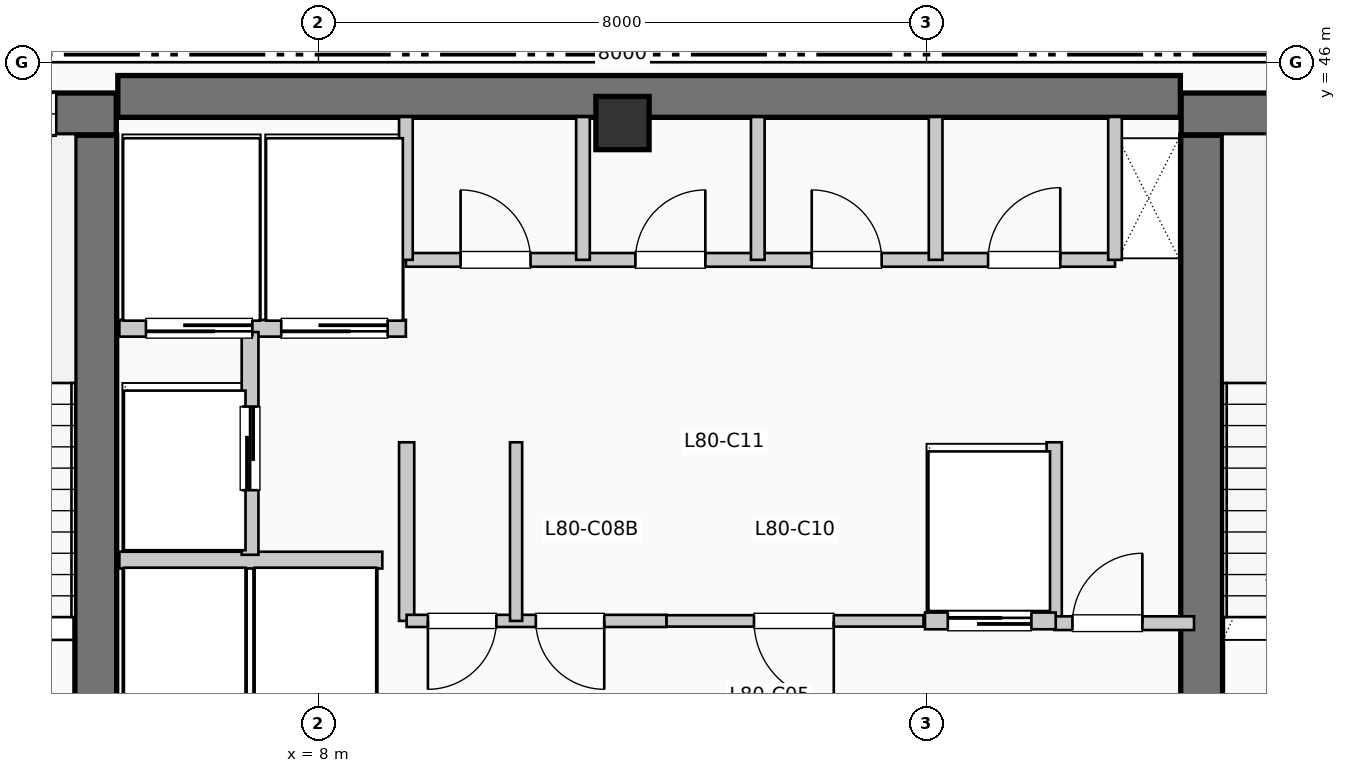
"""IFC4 building model, lengths in metres.
Left out: names, types, materials, properties, quantities, classifications, styles, units other than length and angle.
Written with IfcOpenShell. Run it as: python <this file> out.ifc"""

import sys

from ifc_helpers import new_model, si_unit, direction, frame, frame_2d, origin, origin_2d, place, context, subcontext, project, spatial, rectangle, extrude, element, fill, save


model = new_model("IFC4")
c1 = context("Model", 3, precision=1e-05, world=origin(), true_north=direction((0.0, 1.0)))
c2 = subcontext(c1, "Body", "Model", "MODEL_VIEW")
j1 = project(units=[si_unit("LENGTHUNIT", "METRE"), si_unit("PLANEANGLEUNIT", "RADIAN")], contexts=[c1])
p1 = place(None, origin())
s1 = spatial("IfcSite", under=j1, at=p1, CompositionType="ELEMENT")
p2 = place(p1, origin())
s2 = spatial("IfcBuilding", under=s1, at=p2, CompositionType="ELEMENT")
p3 = place(p2, frame((0.0, 0.0, 327.69)))
s3 = spatial("IfcBuildingStorey", under=s2, at=p3, CompositionType="ELEMENT", Elevation=327.69)
p4 = place(p3, frame((5.36, 45.55, 0.0), z_axis=(0.0, 0.0, 1.0), x_axis=(1.0, 0.0, 0.0)))
e1 = element("IfcWall", 1, at=p4, inside=s3, PredefinedType="SHEAR", context=c2, shape_type="SweptSolid", body=[
    extrude(rectangle(XDim=13.98, YDim=0.55, at=frame_2d((6.99, 0.0))), origin(), (0.0, 0.0, 1.0), 3.96),
])
p5 = place(p3, frame((5.07, 37.15, 0.0), z_axis=(0.0, 0.0, 1.0), x_axis=(0.0, 1.0, 0.0)))
e2 = element("IfcWall", 2, at=p5, inside=s3, PredefinedType="SHEAR", context=c2, shape_type="SweptSolid", body=[
    extrude(rectangle(XDim=7.89, YDim=0.55, at=frame_2d((3.945, 0.0))), origin(), (0.0, 0.0, 1.0), 3.96),
])
p6 = place(p3, frame((1.1, 45.32, 0.0), z_axis=(0.0, 0.0, 1.0), x_axis=(1.0, 0.0, 0.0)))
e3 = element("IfcWall", 3, at=p6, inside=s3, PredefinedType="SHEAR", context=c2, shape_type="SweptSolid", body=[
    extrude(rectangle(XDim=4.24, YDim=0.55, at=frame_2d((2.12, 0.0))), origin(), (0.0, 0.0, 1.0), 3.96),
])
p7 = place(p6, frame((2.05, 0.0, 1.05)))
e4 = element("IfcOpeningElement", 4, at=p7, cuts=e3, PredefinedType="OPENING", context=c2, shape_type="SweptSolid", body=[
    extrude(rectangle(XDim=1.4, YDim=1.8, at=frame_2d((0.7, 0.9))), frame((0.0, 0.285, 0.0), z_axis=(0.0, -1.0, 0.0), x_axis=(1.0, 0.0, 0.0)), (0.0, 0.0, 1.0), 0.57),
])
p8 = place(p3, frame((19.62, 37.15, 0.0), z_axis=(0.0, 0.0, 1.0), x_axis=(0.0, 1.0, 0.0)))
e5 = element("IfcWall", 5, at=p8, inside=s3, PredefinedType="SHEAR", context=c2, shape_type="SweptSolid", body=[
    extrude(rectangle(XDim=7.89, YDim=0.55, at=frame_2d((3.945, 0.0))), origin(), (0.0, 0.0, 1.0), 3.96),
])
p9 = place(p3, frame((19.35, 45.32, 0.0), z_axis=(0.0, 0.0, 1.0), x_axis=(1.0, 0.0, 0.0)))
e6 = element("IfcWall", 6, at=p9, inside=s3, PredefinedType="SHEAR", context=c2, shape_type="SweptSolid", body=[
    extrude(rectangle(XDim=3.69, YDim=0.55, at=frame_2d((1.845, 0.0))), origin(), (0.0, 0.0, 1.0), 3.96),
])
p10 = place(p9, frame((1.15, 0.0, 1.05)))
e7 = element("IfcOpeningElement", 7, at=p10, cuts=e6, PredefinedType="OPENING", context=c2, shape_type="SweptSolid", body=[
    extrude(rectangle(XDim=1.4, YDim=1.8, at=frame_2d((0.7, 0.9))), frame((0.0, 0.285, 0.0), z_axis=(0.0, -1.0, 0.0), x_axis=(1.0, 0.0, 0.0)), (0.0, 0.0, 1.0), 0.57),
])
p11 = place(p3, frame((12.0, 45.2, 0.0), z_axis=(0.0, 0.0, 1.0), x_axis=(1.0, 0.0, 0.0)))
e8 = element("IfcColumn", 8, at=p11, inside=s3, PredefinedType="COLUMN", context=c2, shape_type="SweptSolid", body=[
    extrude(rectangle(XDim=0.7, YDim=0.7, at=origin_2d()), origin(), (0.0, 0.0, 1.0), 3.96),
])
p12 = place(p3, frame((5.38, 39.45, 0.0), z_axis=(0.0, 0.0, 1.0), x_axis=(1.0, 0.0, 0.0)))
e9 = element("IfcWall", 9, at=p12, inside=s3, PredefinedType="PARTITIONING", context=c2, shape_type="SweptSolid", body=[
    extrude(rectangle(XDim=3.46, YDim=0.22, at=frame_2d((1.73, 0.0))), origin(), (0.0, 0.0, 1.0), 3.74),
])
p13 = place(p3, frame((5.38, 42.5, 0.0), z_axis=(0.0, 0.0, 1.0), x_axis=(1.0, 0.0, 0.0)))
e10 = element("IfcWall", 10, at=p13, inside=s3, PredefinedType="PARTITIONING", context=c2, shape_type="SweptSolid", body=[
    extrude(rectangle(XDim=3.77, YDim=0.22, at=frame_2d((1.885, 0.0))), origin(), (0.0, 0.0, 1.0), 3.74),
])
p14 = place(p13, frame((1.75, 0.0, 0.0), z_axis=(0.0, 0.0, 1.0), x_axis=(-1.0, 0.0, 0.0)))
e11 = element("IfcOpeningElement", 11, at=p14, cuts=e10, PredefinedType="OPENING", context=c2, shape_type="SweptSolid", body=[
    extrude(rectangle(XDim=1.4, YDim=2.2, at=frame_2d((0.7, 1.1))), frame((0.0, 0.12, 0.0), z_axis=(0.0, -1.0, 0.0), x_axis=(1.0, 0.0, 0.0)), (0.0, 0.0, 1.0), 0.24),
])
p15 = place(p13, frame((3.53, 0.0, 0.0), z_axis=(0.0, 0.0, 1.0), x_axis=(-1.0, 0.0, 0.0)))
e12 = element("IfcOpeningElement", 12, at=p15, cuts=e10, PredefinedType="OPENING", context=c2, shape_type="SweptSolid", body=[
    extrude(rectangle(XDim=1.4, YDim=2.2, at=frame_2d((0.7, 1.1))), frame((0.0, 0.12, 0.0), z_axis=(0.0, -1.0, 0.0), x_axis=(1.0, 0.0, 0.0)), (0.0, 0.0, 1.0), 0.24),
])
p16 = place(p3, frame((7.1, 39.52, 0.0), z_axis=(0.0, 0.0, 1.0), x_axis=(0.0, 1.0, 0.0)))
e13 = element("IfcWall", 13, at=p16, inside=s3, PredefinedType="PARTITIONING", context=c2, shape_type="SweptSolid", body=[
    extrude(rectangle(XDim=2.93, YDim=0.22, at=frame_2d((1.465, 0.0))), origin(), (0.0, 0.0, 1.0), 3.74),
])
p17 = place(p16, frame((0.85, 0.0, 0.0)))
e14 = element("IfcOpeningElement", 14, at=p17, cuts=e13, PredefinedType="OPENING", context=c2, shape_type="SweptSolid", body=[
    extrude(rectangle(XDim=1.1, YDim=2.2, at=frame_2d((0.55, 1.1))), frame((0.0, 0.12, 0.0), z_axis=(0.0, -1.0, 0.0), x_axis=(1.0, 0.0, 0.0)), (0.0, 0.0, 1.0), 0.24),
])
for number, where, z_axis, x_axis in (
    (15, (9.16, 38.65, 0.0), (0.0, 0.0, 1.0), (0.0, 1.0, 0.0)),
    (16, (17.68, 38.65, 0.0), (0.0, 0.0, 1.0), (0.0, 1.0, 0.0)),
):
    element("IfcWall", number, at=place(p3, frame(where, z_axis=z_axis, x_axis=x_axis)), inside=s3, PredefinedType="PARTITIONING", context=c2, shape_type="SweptSolid", body=[
        extrude(rectangle(XDim=2.35, YDim=0.2, at=frame_2d((1.175, 0.0))), origin(), (0.0, 0.0, 1.0), 3.74),
    ])
p18 = place(p3, frame((17.68, 38.62, 0.0), z_axis=(0.0, 0.0, 1.0), x_axis=(1.0, 0.0, 0.0)))
e17 = element("IfcWall", 17, at=p18, inside=s3, PredefinedType="PARTITIONING", context=c2, shape_type="SweptSolid", body=[
    extrude(rectangle(XDim=1.84, YDim=0.18, at=frame_2d((0.92, 0.0))), origin(), (0.0, 0.0, 1.0), 3.74),
])
p19 = place(p18, frame((0.24, 0.0, 0.0)))
e18 = element("IfcOpeningElement", 18, at=p19, cuts=e17, PredefinedType="OPENING", context=c2, shape_type="SweptSolid", body=[
    extrude(rectangle(XDim=0.92, YDim=2.1, at=frame_2d((0.46, 1.05))), frame((0.0, 0.1, 0.0), z_axis=(0.0, -1.0, 0.0), x_axis=(1.0, 0.0, 0.0)), (0.0, 0.0, 1.0), 0.2),
])
p20 = place(p3, frame((9.16, 38.65, 0.0), z_axis=(0.0, 0.0, 1.0), x_axis=(1.0, 0.0, 0.0)))
e19 = element("IfcWall", 19, at=p20, inside=s3, PredefinedType="PARTITIONING", context=c2, shape_type="SweptSolid", body=[
    extrude(rectangle(XDim=3.42, YDim=0.16, at=frame_2d((1.71, 0.0))), origin(), (0.0, 0.0, 1.0), 3.74),
])
p21 = place(p20, frame((1.18, 0.0, 0.0), z_axis=(0.0, 0.0, 1.0), x_axis=(-1.0, 0.0, 0.0)))
e20 = element("IfcOpeningElement", 20, at=p21, cuts=e19, PredefinedType="OPENING", context=c2, shape_type="SweptSolid", body=[
    extrude(rectangle(XDim=0.9, YDim=2.15, at=frame_2d((0.45, 1.075))), frame((0.0, 0.09, 0.0), z_axis=(0.0, -1.0, 0.0), x_axis=(1.0, 0.0, 0.0)), (0.0, 0.0, 1.0), 0.18),
])
p22 = place(p20, frame((2.6, 0.0, 0.0), z_axis=(0.0, 0.0, 1.0), x_axis=(-1.0, 0.0, 0.0)))
e21 = element("IfcOpeningElement", 21, at=p22, cuts=e19, PredefinedType="OPENING", context=c2, shape_type="SweptSolid", body=[
    extrude(rectangle(XDim=0.9, YDim=2.15, at=frame_2d((0.45, 1.075))), frame((0.0, 0.09, 0.0), z_axis=(0.0, -1.0, 0.0), x_axis=(1.0, 0.0, 0.0)), (0.0, 0.0, 1.0), 0.18),
])
p23 = place(p3, frame((10.6, 38.65, 0.0), z_axis=(0.0, 0.0, 1.0), x_axis=(0.0, 1.0, 0.0)))
e22 = element("IfcWall", 22, at=p23, inside=s3, PredefinedType="PARTITIONING", context=c2, shape_type="SweptSolid", body=[
    extrude(rectangle(XDim=2.35, YDim=0.16, at=frame_2d((1.175, 0.0))), origin(), (0.0, 0.0, 1.0), 3.74),
])
p24 = place(p3, frame((12.58, 38.65, 0.0), z_axis=(0.0, 0.0, 1.0), x_axis=(1.0, 0.0, 0.0)))
e23 = element("IfcWall", 23, at=p24, inside=s3, PredefinedType="PARTITIONING", context=c2, shape_type="SweptSolid", body=[
    extrude(rectangle(XDim=3.38, YDim=0.15, at=frame_2d((1.69, 0.0))), origin(), (0.0, 0.0, 1.0), 3.74),
])
p25 = place(p24, frame((2.2, 0.0, 0.0), z_axis=(0.0, 0.0, 1.0), x_axis=(-1.0, 0.0, 0.0)))
e24 = element("IfcOpeningElement", 24, at=p25, cuts=e23, PredefinedType="OPENING", context=c2, shape_type="SweptSolid", body=[
    extrude(rectangle(XDim=1.05, YDim=2.15, at=frame_2d((0.525, 1.075))), frame((0.0, 0.085, 0.0), z_axis=(0.0, -1.0, 0.0), x_axis=(1.0, 0.0, 0.0)), (0.0, 0.0, 1.0), 0.17),
])
p26 = place(p3, frame((15.98, 38.65, 0.0), z_axis=(0.0, 0.0, 1.0), x_axis=(1.0, 0.0, 0.0)))
e25 = element("IfcWall", 25, at=p26, inside=s3, PredefinedType="PARTITIONING", context=c2, shape_type="SweptSolid", body=[
    extrude(rectangle(XDim=1.72, YDim=0.22, at=frame_2d((0.86, 0.0))), origin(), (0.0, 0.0, 1.0), 3.74),
])
p27 = place(p26, frame((0.3, 0.0, 0.0)))
e26 = element("IfcOpeningElement", 26, at=p27, cuts=e25, PredefinedType="OPENING", context=c2, shape_type="SweptSolid", body=[
    extrude(rectangle(XDim=1.1, YDim=2.2, at=frame_2d((0.55, 1.1))), frame((0.0, 0.12, 0.0), z_axis=(0.0, -1.0, 0.0), x_axis=(1.0, 0.0, 0.0)), (0.0, 0.0, 1.0), 0.24),
])
p28 = place(p3, frame((9.15, 43.4, 0.0), z_axis=(0.0, 0.0, 1.0), x_axis=(1.0, 0.0, 0.0)))
e27 = element("IfcWall", 27, at=p28, inside=s3, PredefinedType="PLUMBINGWALL", context=c2, shape_type="SweptSolid", body=[
    extrude(rectangle(XDim=9.33, YDim=0.18, at=frame_2d((4.665, 0.0))), origin(), (0.0, 0.0, 1.0), 3.74),
])
p29 = place(p28, frame((0.72, 0.0, 0.0)))
e28 = element("IfcOpeningElement", 28, at=p29, cuts=e27, PredefinedType="OPENING", context=c2, shape_type="SweptSolid", body=[
    extrude(rectangle(XDim=0.92, YDim=2.1, at=frame_2d((0.46, 1.05))), frame((0.0, 0.1, 0.0), z_axis=(0.0, -1.0, 0.0), x_axis=(1.0, 0.0, 0.0)), (0.0, 0.0, 1.0), 0.2),
])
p30 = place(p28, frame((3.02, 0.0, 0.0)))
e29 = element("IfcOpeningElement", 29, at=p30, cuts=e27, PredefinedType="OPENING", context=c2, shape_type="SweptSolid", body=[
    extrude(rectangle(XDim=0.92, YDim=2.1, at=frame_2d((0.46, 1.05))), frame((0.0, 0.1, 0.0), z_axis=(0.0, -1.0, 0.0), x_axis=(1.0, 0.0, 0.0)), (0.0, 0.0, 1.0), 0.2),
])
p31 = place(p28, frame((5.34, 0.0, 0.0)))
e30 = element("IfcOpeningElement", 30, at=p31, cuts=e27, PredefinedType="OPENING", context=c2, shape_type="SweptSolid", body=[
    extrude(rectangle(XDim=0.92, YDim=2.1, at=frame_2d((0.46, 1.05))), frame((0.0, 0.1, 0.0), z_axis=(0.0, -1.0, 0.0), x_axis=(1.0, 0.0, 0.0)), (0.0, 0.0, 1.0), 0.2),
])
p32 = place(p28, frame((7.66, 0.0, 0.0)))
e31 = element("IfcOpeningElement", 31, at=p32, cuts=e27, PredefinedType="OPENING", context=c2, shape_type="SweptSolid", body=[
    extrude(rectangle(XDim=0.95, YDim=2.1, at=frame_2d((0.475, 1.05))), frame((0.0, 0.1, 0.0), z_axis=(0.0, -1.0, 0.0), x_axis=(1.0, 0.0, 0.0)), (0.0, 0.0, 1.0), 0.2),
])
for number, where, z_axis, x_axis in (
    (32, (9.15, 43.4, 0.0), (0.0, 0.0, 1.0), (0.0, 1.0, 0.0)),
    (33, (18.48, 43.4, 0.0), (0.0, 0.0, 1.0), (0.0, 1.0, 0.0)),
    (34, (11.48, 43.4, 0.0), (0.0, 0.0, 1.0), (0.0, 1.0, 0.0)),
    (35, (13.78, 43.4, 0.0), (0.0, 0.0, 1.0), (0.0, 1.0, 0.0)),
    (36, (16.12, 43.4, 0.0), (0.0, 0.0, 1.0), (0.0, 1.0, 0.0)),
):
    element("IfcWall", number, at=place(p3, frame(where, z_axis=z_axis, x_axis=x_axis)), inside=s3, PredefinedType="PLUMBINGWALL", context=c2, shape_type="SweptSolid", body=[
        extrude(rectangle(XDim=1.88, YDim=0.18, at=frame_2d((0.94, 0.0))), origin(), (0.0, 0.0, 1.0), 3.74),
    ])
p33 = place(p7, origin())
e37 = element("IfcWindow", 37, at=p33, inside=s3, PartitioningType="SINGLE_PANEL", PredefinedType="WINDOW", context=c2, shape_type="SweptSolid", body=[
    extrude(rectangle(XDim=1.4, YDim=1.8, at=frame_2d((0.7, 0.9))), frame((0.0, 0.03, 0.0), z_axis=(0.0, -1.0, 0.0), x_axis=(1.0, 0.0, 0.0)), (0.0, 0.0, 1.0), 0.06),
])
fill(e4, e37)
p34 = place(p14, origin())
e38 = element("IfcDoor", 38, at=p34, inside=s3, OperationType="SLIDING_TO_LEFT", PredefinedType="DOOR", context=c2, shape_type="SweptSolid", body=[
    extrude(rectangle(XDim=1.4, YDim=2.2, at=frame_2d((0.7, 1.1))), frame((0.0, 0.025, 0.0), z_axis=(0.0, -1.0, 0.0), x_axis=(1.0, 0.0, 0.0)), (0.0, 0.0, 1.0), 0.05),
])
fill(e11, e38)
p35 = place(p15, origin())
e39 = element("IfcDoor", 39, at=p35, inside=s3, OperationType="SLIDING_TO_LEFT", PredefinedType="DOOR", context=c2, shape_type="SweptSolid", body=[
    extrude(rectangle(XDim=1.4, YDim=2.2, at=frame_2d((0.7, 1.1))), frame((0.0, 0.025, 0.0), z_axis=(0.0, -1.0, 0.0), x_axis=(1.0, 0.0, 0.0)), (0.0, 0.0, 1.0), 0.05),
])
fill(e12, e39)
p36 = place(p17, origin())
e40 = element("IfcDoor", 40, at=p36, inside=s3, OperationType="SLIDING_TO_LEFT", PredefinedType="DOOR", context=c2, shape_type="SweptSolid", body=[
    extrude(rectangle(XDim=1.1, YDim=2.2, at=frame_2d((0.55, 1.1))), frame((0.0, 0.025, 0.0), z_axis=(0.0, -1.0, 0.0), x_axis=(1.0, 0.0, 0.0)), (0.0, 0.0, 1.0), 0.05),
])
fill(e14, e40)
p37 = place(p19, origin())
e41 = element("IfcDoor", 41, at=p37, inside=s3, OperationType="SINGLE_SWING_RIGHT", PredefinedType="DOOR", context=c2, shape_type="SweptSolid", body=[
    extrude(rectangle(XDim=0.92, YDim=2.1, at=frame_2d((0.46, 1.05))), frame((0.0, 0.025, 0.0), z_axis=(0.0, -1.0, 0.0), x_axis=(1.0, 0.0, 0.0)), (0.0, 0.0, 1.0), 0.05),
])
fill(e18, e41)
p38 = place(p21, origin())
e42 = element("IfcDoor", 42, at=p38, inside=s3, OperationType="SINGLE_SWING_LEFT", PredefinedType="DOOR", context=c2, shape_type="SweptSolid", body=[
    extrude(rectangle(XDim=0.9, YDim=2.15, at=frame_2d((0.45, 1.075))), frame((0.0, 0.025, 0.0), z_axis=(0.0, -1.0, 0.0), x_axis=(1.0, 0.0, 0.0)), (0.0, 0.0, 1.0), 0.05),
])
fill(e20, e42)
p39 = place(p22, origin())
e43 = element("IfcDoor", 43, at=p39, inside=s3, OperationType="SINGLE_SWING_RIGHT", PredefinedType="DOOR", context=c2, shape_type="SweptSolid", body=[
    extrude(rectangle(XDim=0.9, YDim=2.15, at=frame_2d((0.45, 1.075))), frame((0.0, 0.025, 0.0), z_axis=(0.0, -1.0, 0.0), x_axis=(1.0, 0.0, 0.0)), (0.0, 0.0, 1.0), 0.05),
])
fill(e21, e43)
p40 = place(p25, origin())
e44 = element("IfcDoor", 44, at=p40, inside=s3, OperationType="SINGLE_SWING_RIGHT", PredefinedType="DOOR", context=c2, shape_type="SweptSolid", body=[
    extrude(rectangle(XDim=1.05, YDim=2.15, at=frame_2d((0.525, 1.075))), frame((0.0, 0.025, 0.0), z_axis=(0.0, -1.0, 0.0), x_axis=(1.0, 0.0, 0.0)), (0.0, 0.0, 1.0), 0.05),
])
fill(e24, e44)
p41 = place(p27, origin())
e45 = element("IfcDoor", 45, at=p41, inside=s3, OperationType="SLIDING_TO_LEFT", PredefinedType="DOOR", context=c2, shape_type="SweptSolid", body=[
    extrude(rectangle(XDim=1.1, YDim=2.2, at=frame_2d((0.55, 1.1))), frame((0.0, 0.025, 0.0), z_axis=(0.0, -1.0, 0.0), x_axis=(1.0, 0.0, 0.0)), (0.0, 0.0, 1.0), 0.05),
])
fill(e26, e45)
p42 = place(p29, origin())
e46 = element("IfcDoor", 46, at=p42, inside=s3, OperationType="SINGLE_SWING_LEFT", PredefinedType="DOOR", context=c2, shape_type="SweptSolid", body=[
    extrude(rectangle(XDim=0.92, YDim=2.1, at=frame_2d((0.46, 1.05))), frame((0.0, 0.025, 0.0), z_axis=(0.0, -1.0, 0.0), x_axis=(1.0, 0.0, 0.0)), (0.0, 0.0, 1.0), 0.05),
])
fill(e28, e46)
p43 = place(p30, origin())
e47 = element("IfcDoor", 47, at=p43, inside=s3, OperationType="SINGLE_SWING_RIGHT", PredefinedType="DOOR", context=c2, shape_type="SweptSolid", body=[
    extrude(rectangle(XDim=0.92, YDim=2.1, at=frame_2d((0.46, 1.05))), frame((0.0, 0.025, 0.0), z_axis=(0.0, -1.0, 0.0), x_axis=(1.0, 0.0, 0.0)), (0.0, 0.0, 1.0), 0.05),
])
fill(e29, e47)
p44 = place(p31, origin())
e48 = element("IfcDoor", 48, at=p44, inside=s3, OperationType="SINGLE_SWING_LEFT", PredefinedType="DOOR", context=c2, shape_type="SweptSolid", body=[
    extrude(rectangle(XDim=0.92, YDim=2.1, at=frame_2d((0.46, 1.05))), frame((0.0, 0.025, 0.0), z_axis=(0.0, -1.0, 0.0), x_axis=(1.0, 0.0, 0.0)), (0.0, 0.0, 1.0), 0.05),
])
fill(e30, e48)
p45 = place(p32, origin())
e49 = element("IfcDoor", 49, at=p45, inside=s3, OperationType="SINGLE_SWING_RIGHT", PredefinedType="DOOR", context=c2, shape_type="SweptSolid", body=[
    extrude(rectangle(XDim=0.95, YDim=2.1, at=frame_2d((0.475, 1.05))), frame((0.0, 0.025, 0.0), z_axis=(0.0, -1.0, 0.0), x_axis=(1.0, 0.0, 0.0)), (0.0, 0.0, 1.0), 0.05),
])
fill(e31, e49)
save(model, sys.argv[1])
